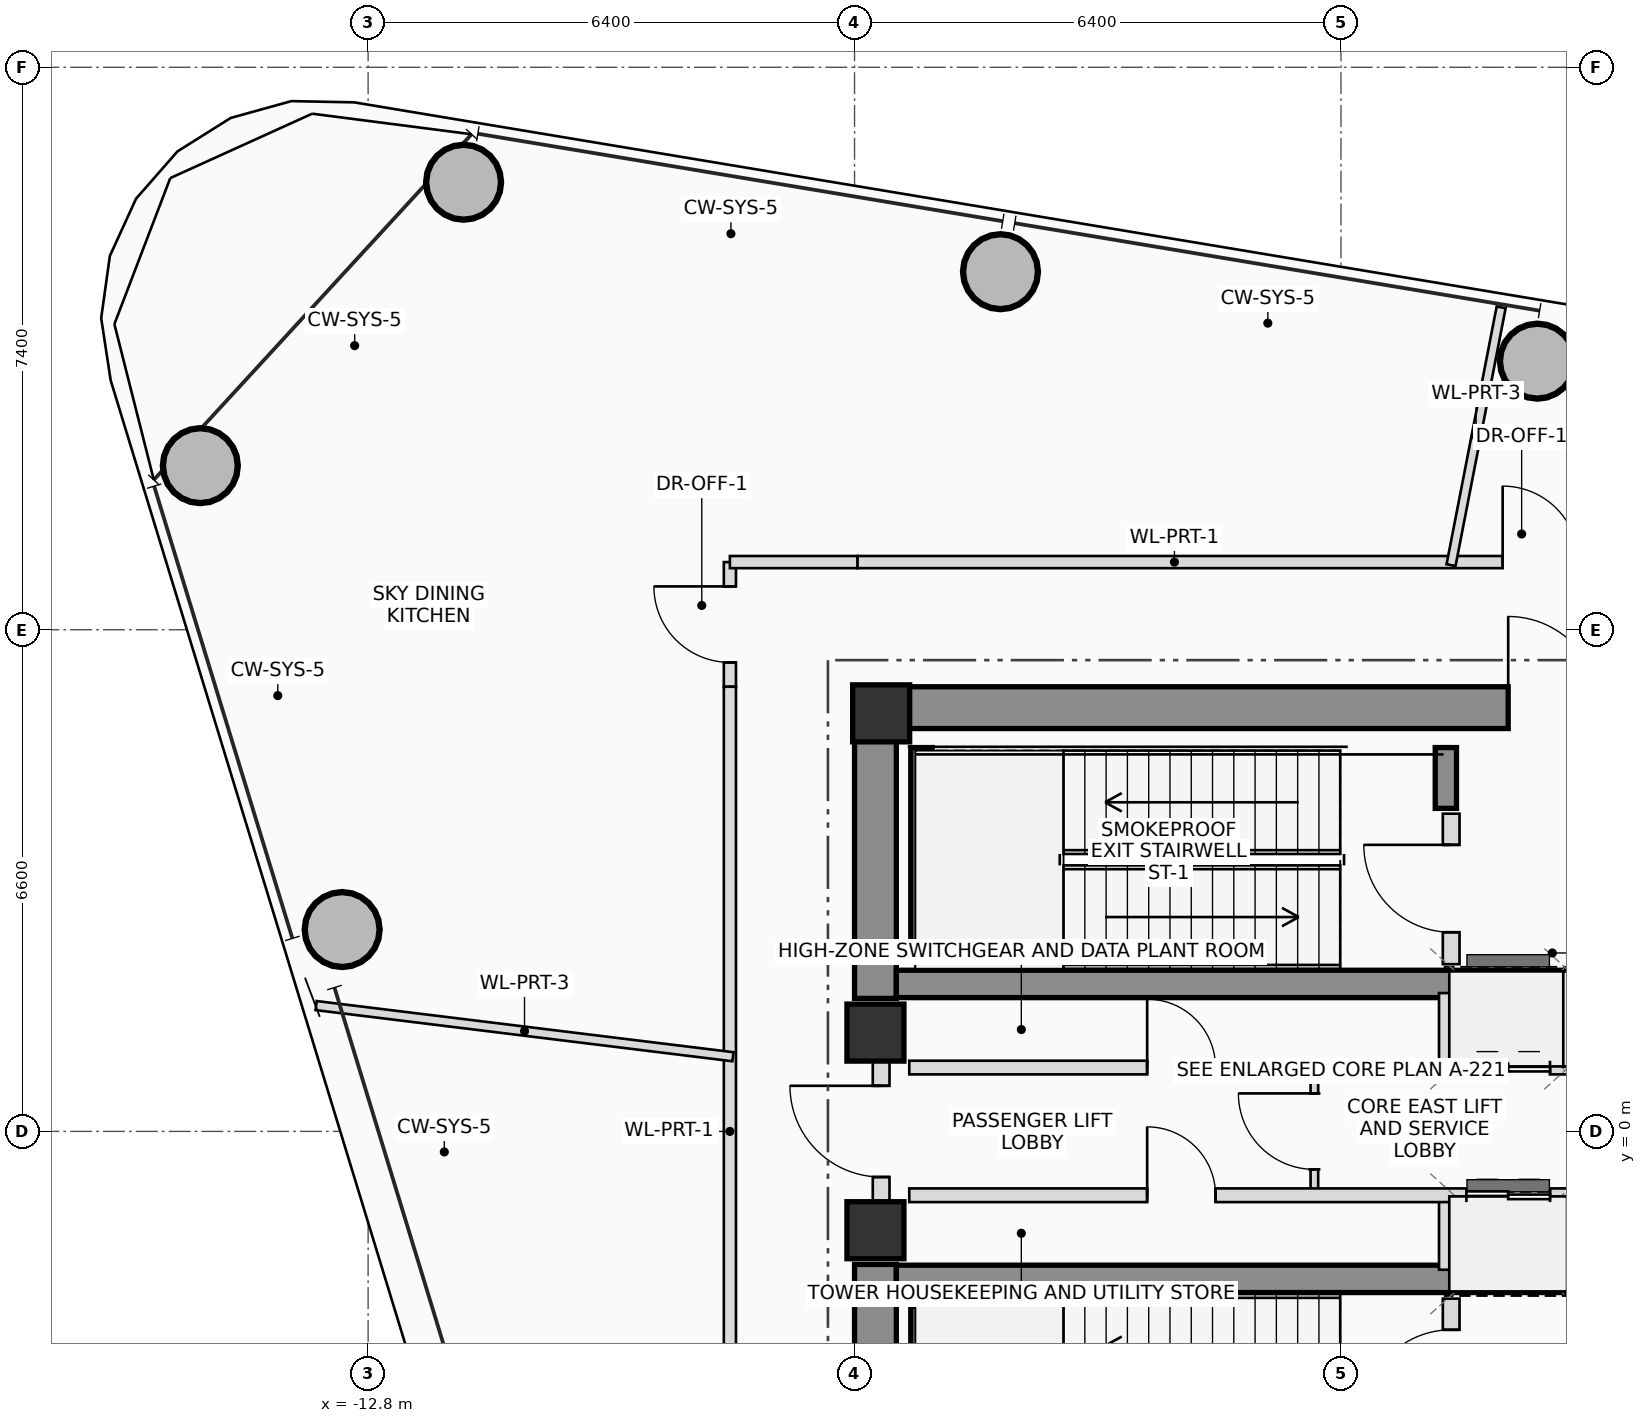
"""IFC4 building model, lengths in metres.
Left out: names, types, materials, properties, quantities, classifications, styles, units other than length and angle.
Written with IfcOpenShell. Run it as: python <this file> out.ifc"""

import sys

from ifc_helpers import new_model, si_unit, direction, frame, frame_2d, origin, origin_2d, place, context, subcontext, project, spatial, rectangle, hollow_circle, extrude, source, transform, mapped, element, fill, save


model = new_model("IFC4")
c1 = context("Model", 3, precision=1e-05, world=origin(), true_north=direction((0.0, 1.0)))
c2 = subcontext(c1, "Body", "Model", "MODEL_VIEW")
j1 = project(units=[si_unit("LENGTHUNIT", "METRE"), si_unit("PLANEANGLEUNIT", "RADIAN")], contexts=[c1])
p1 = place(None, origin())
s1 = spatial("IfcSite", under=j1, at=p1, CompositionType="ELEMENT")
p2 = place(p1, origin())
s2 = spatial("IfcBuilding", under=s1, at=p2, CompositionType="ELEMENT")
p3 = place(p2, frame((0.0, 0.0, 224.15)))
s3 = spatial("IfcBuildingStorey", under=s2, at=p3, CompositionType="ELEMENT", Elevation=224.15)
m1 = source(origin(), c2, "Body", "SweptSolid", [
    extrude(rectangle(XDim=0.75, YDim=0.75, at=origin_2d()), origin(), (0.0, 0.0, 1.0), 4.5),
])
p4 = place(p3, frame((-6.05, 5.5, 0.0), z_axis=(0.0, 0.0, 1.0), x_axis=(1.0, 0.0, 0.0)))
e1 = element("IfcColumn", 1, at=p4, inside=s3, PredefinedType="COLUMN", context=c2, shape_type="MappedRepresentation", body=[
    mapped(m1, transform((0.0, 0.0, 0.0), scale=1.0)),
])
p5 = place(p3, frame((-6.4, 5.575, 0.0), z_axis=(0.0, 0.0, 1.0), x_axis=(1.0, 0.0, 0.0)))
e2 = element("IfcWall", 2, at=p5, inside=s3, PredefinedType="SHEAR", context=c2, shape_type="SweptSolid", body=[
    extrude(rectangle(XDim=12.8, YDim=0.55, at=frame_2d((6.4, 0.0))), origin(), (0.0, 0.0, 1.0), 4.5),
])
p6 = place(p5, frame((8.6, 0.0, 0.0)))
e3 = element("IfcOpeningElement", 3, at=p6, cuts=e2, PredefinedType="OPENING", context=c2, shape_type="SweptSolid", body=[
    extrude(rectangle(XDim=1.2, YDim=2.2, at=frame_2d((0.6, 1.1))), frame((0.0, 0.285, 0.0), z_axis=(0.0, -1.0, 0.0), x_axis=(1.0, 0.0, 0.0)), (0.0, 0.0, 1.0), 0.57),
])
for number, where, z_axis, x_axis in (
    (4, (-6.125, -5.3, 0.0), (0.0, 0.0, 1.0), (0.0, 1.0, 0.0)),
    (5, (-6.125, 1.75, 0.0), (0.0, 0.0, 1.0), (0.0, 1.0, 0.0)),
):
    element("IfcWall", number, at=place(p3, frame(where, z_axis=z_axis, x_axis=x_axis)), inside=s3, PredefinedType="SHEAR", context=c2, shape_type="SweptSolid", body=[
        extrude(rectangle(XDim=3.55, YDim=0.55, at=frame_2d((1.775, 0.0))), origin(), (0.0, 0.0, 1.0), 4.5),
    ])
for number, where, z_axis, x_axis in (
    (6, (-5.85, 1.94, 0.0), (0.0, 0.0, 1.0), (1.0, 0.0, 0.0)),
    (7, (-5.85, -1.94, 0.0), (0.0, 0.0, 1.0), (1.0, 0.0, 0.0)),
):
    element("IfcWall", number, at=place(p3, frame(where, z_axis=z_axis, x_axis=x_axis)), inside=s3, PredefinedType="SHEAR", context=c2, shape_type="SweptSolid", body=[
        extrude(rectangle(XDim=11.7, YDim=0.36, at=frame_2d((5.85, 0.0))), origin(), (0.0, 0.0, 1.0), 4.5),
    ])
p7 = place(p3, frame((-5.52, 2.3, 0.0), z_axis=(0.0, 0.0, 1.0), x_axis=(0.0, 1.0, 0.0)))
e8 = element("IfcWall", 8, at=p7, inside=s3, PredefinedType="SHEAR", context=c2, shape_type="SweptSolid", body=[
    extrude(rectangle(XDim=2.75, YDim=0.28, at=frame_2d((1.375, 0.0))), origin(), (0.0, 0.0, 1.0), 4.5),
])
p8 = place(p3, frame((1.38, 4.25, 0.0), z_axis=(0.0, 0.0, 1.0), x_axis=(0.0, 1.0, 0.0)))
e9 = element("IfcWall", 9, at=p8, inside=s3, PredefinedType="SHEAR", context=c2, shape_type="SweptSolid", body=[
    extrude(rectangle(XDim=0.8, YDim=0.28, at=frame_2d((0.4, 0.0))), origin(), (0.0, 0.0, 1.0), 4.5),
])
p9 = place(p3, frame((-5.52, -5.05, 0.0), z_axis=(0.0, 0.0, 1.0), x_axis=(0.0, 1.0, 0.0)))
e10 = element("IfcWall", 10, at=p9, inside=s3, PredefinedType="SHEAR", context=c2, shape_type="SweptSolid", body=[
    extrude(rectangle(XDim=2.75, YDim=0.28, at=frame_2d((1.375, 0.0))), origin(), (0.0, 0.0, 1.0), 4.5),
])
for number, where, z_axis, x_axis in (
    (11, (-6.125, -1.3, 0.0), (0.0, 0.0, 1.0), (1.0, 0.0, 0.0)),
    (12, (-6.125, 1.3, 0.0), (0.0, 0.0, 1.0), (1.0, 0.0, 0.0)),
):
    element("IfcColumn", number, at=place(p3, frame(where, z_axis=z_axis, x_axis=x_axis)), inside=s3, PredefinedType="COLUMN", context=c2, shape_type="MappedRepresentation", body=[
        mapped(m1, transform((0.0, 0.0, 0.0), scale=1.0)),
    ])
m2 = source(origin(), c2, "Body", "SweptSolid", [
    extrude(hollow_circle(Radius=0.5, WallThickness=0.04, at=origin_2d()), origin(), (0.0, 0.0, 1.0), 4.5),
])
for number, where, z_axis, x_axis in (
    (13, (2.584, 10.134, 0.0), (0.0, 0.0, 1.0), (1.0, 0.0, 0.0)),
    (14, (-4.48, 11.311, 0.0), (0.0, 0.0, 1.0), (1.0, 0.0, 0.0)),
    (15, (-11.544, 12.488, 0.0), (0.0, 0.0, 1.0), (1.0, 0.0, 0.0)),
    (16, (-15.008, 8.759, 0.0), (0.0, 0.0, 1.0), (1.0, 0.0, 0.0)),
    (17, (-13.142, 2.656, 0.0), (0.0, 0.0, 1.0), (1.0, 0.0, 0.0)),
):
    element("IfcColumn", number, at=place(p3, frame(where, z_axis=z_axis, x_axis=x_axis)), inside=s3, PredefinedType="COLUMN", context=c2, shape_type="MappedRepresentation", body=[
        mapped(m2, transform((0.0, 0.0, 0.0), scale=1.0)),
    ])
p10 = place(p3, frame((-6.05, -0.95, 0.0), z_axis=(0.0, 0.0, 1.0), x_axis=(0.0, 1.0, 0.0)))
e18 = element("IfcWall", 18, at=p10, inside=s3, PredefinedType="PLUMBINGWALL", context=c2, shape_type="SweptSolid", body=[
    extrude(rectangle(XDim=1.9, YDim=0.22, at=frame_2d((0.95, 0.0))), origin(), (0.0, 0.0, 1.0), 3.28),
])
p11 = place(p10, frame((0.35, 0.0, 0.0)))
e19 = element("IfcOpeningElement", 19, at=p11, cuts=e18, PredefinedType="OPENING", context=c2, shape_type="SweptSolid", body=[
    extrude(rectangle(XDim=1.2, YDim=2.2, at=frame_2d((0.6, 1.1))), frame((0.0, 0.12, 0.0), z_axis=(0.0, -1.0, 0.0), x_axis=(1.0, 0.0, 0.0)), (0.0, 0.0, 1.0), 0.24),
])
p12 = place(p3, frame((1.45, 2.2, 0.0), z_axis=(0.0, 0.0, 1.0), x_axis=(0.0, 1.0, 0.0)))
e20 = element("IfcWall", 20, at=p12, inside=s3, PredefinedType="PLUMBINGWALL", context=c2, shape_type="SweptSolid", body=[
    extrude(rectangle(XDim=1.98, YDim=0.22, at=frame_2d((0.99, 0.0))), origin(), (0.0, 0.0, 1.0), 4.3),
])
p13 = place(p12, frame((0.42, 0.0, 0.0)))
e21 = element("IfcOpeningElement", 21, at=p13, cuts=e20, PredefinedType="OPENING", context=c2, shape_type="SweptSolid", body=[
    extrude(rectangle(XDim=1.15, YDim=2.15, at=frame_2d((0.575, 1.075))), frame((0.0, 0.12, 0.0), z_axis=(0.0, -1.0, 0.0), x_axis=(1.0, 0.0, 0.0)), (0.0, 0.0, 1.0), 0.24),
])
p14 = place(p3, frame((1.45, -4.18, 0.0), z_axis=(0.0, 0.0, 1.0), x_axis=(0.0, 1.0, 0.0)))
e22 = element("IfcWall", 22, at=p14, inside=s3, PredefinedType="PLUMBINGWALL", context=c2, shape_type="SweptSolid", body=[
    extrude(rectangle(XDim=1.98, YDim=0.22, at=frame_2d((0.99, 0.0))), origin(), (0.0, 0.0, 1.0), 4.3),
])
p15 = place(p14, frame((0.42, 0.0, 0.0)))
e23 = element("IfcOpeningElement", 23, at=p15, cuts=e22, PredefinedType="OPENING", context=c2, shape_type="SweptSolid", body=[
    extrude(rectangle(XDim=1.15, YDim=2.15, at=frame_2d((0.575, 1.075))), frame((0.0, 0.12, 0.0), z_axis=(0.0, -1.0, 0.0), x_axis=(1.0, 0.0, 0.0)), (0.0, 0.0, 1.0), 0.24),
])
p16 = place(p3, frame((-0.35, -0.84, 0.0), z_axis=(0.0, 0.0, 1.0), x_axis=(0.0, 1.0, 0.0)))
e24 = element("IfcWall", 24, at=p16, inside=s3, PredefinedType="PARTITIONING", context=c2, shape_type="SweptSolid", body=[
    extrude(rectangle(XDim=1.68, YDim=0.1, at=frame_2d((0.84, 0.0))), origin(), (0.0, 0.0, 1.0), 4.3),
])
p17 = place(p16, frame((0.34, 0.0, 0.0)))
e25 = element("IfcOpeningElement", 25, at=p17, cuts=e24, PredefinedType="OPENING", context=c2, shape_type="SweptSolid", body=[
    extrude(rectangle(XDim=1.0, YDim=2.25, at=frame_2d((0.5, 1.125))), frame((0.0, 0.06, 0.0), z_axis=(0.0, -1.0, 0.0), x_axis=(1.0, 0.0, 0.0)), (0.0, 0.0, 1.0), 0.12),
])
for number, where, z_axis, x_axis in (
    (26, (1.38, 0.84, 0.0), (0.0, 0.0, 1.0), (0.0, 1.0, 0.0)),
    (27, (1.38, -1.82, 0.0), (0.0, 0.0, 1.0), (0.0, 1.0, 0.0)),
    (28, (3.02, 0.84, 0.0), (0.0, 0.0, 1.0), (0.0, 1.0, 0.0)),
    (29, (3.02, -1.82, 0.0), (0.0, 0.0, 1.0), (0.0, 1.0, 0.0)),
):
    element("IfcWall", number, at=place(p3, frame(where, z_axis=z_axis, x_axis=x_axis)), inside=s3, PredefinedType="PLUMBINGWALL", context=c2, shape_type="SweptSolid", body=[
        extrude(rectangle(XDim=0.98, YDim=0.18, at=frame_2d((0.49, 0.0))), origin(), (0.0, 0.0, 1.0), 4.3),
    ])
p18 = place(p3, frame((-5.68, 0.84, 0.0), z_axis=(0.0, 0.0, 1.0), x_axis=(1.0, 0.0, 0.0)))
e30 = element("IfcWall", 30, at=p18, inside=s3, PredefinedType="PLUMBINGWALL", context=c2, shape_type="SweptSolid", body=[
    extrude(rectangle(XDim=11.33, YDim=0.18, at=frame_2d((5.665, 0.0))), origin(), (0.0, 0.0, 1.0), 4.3),
])
p19 = place(p18, frame((3.13, 0.0, 0.0)))
e31 = element("IfcOpeningElement", 31, at=p19, cuts=e30, PredefinedType="OPENING", context=c2, shape_type="SweptSolid", body=[
    extrude(rectangle(XDim=0.9, YDim=2.05, at=frame_2d((0.45, 1.025))), frame((0.0, 0.1, 0.0), z_axis=(0.0, -1.0, 0.0), x_axis=(1.0, 0.0, 0.0)), (0.0, 0.0, 1.0), 0.2),
])
p20 = place(p18, frame((7.33, 0.0, 0.0)))
e32 = element("IfcOpeningElement", 32, at=p20, cuts=e30, PredefinedType="OPENING", context=c2, shape_type="SweptSolid", body=[
    extrude(rectangle(XDim=1.1, YDim=2.2, at=frame_2d((0.55, 1.1))), frame((0.0, 0.1, 0.0), z_axis=(0.0, -1.0, 0.0), x_axis=(1.0, 0.0, 0.0)), (0.0, 0.0, 1.0), 0.2),
])
p21 = place(p18, frame((8.83, 0.0, 0.0)))
e33 = element("IfcOpeningElement", 33, at=p21, cuts=e30, PredefinedType="OPENING", context=c2, shape_type="SweptSolid", body=[
    extrude(rectangle(XDim=1.1, YDim=2.2, at=frame_2d((0.55, 1.1))), frame((0.0, 0.1, 0.0), z_axis=(0.0, -1.0, 0.0), x_axis=(1.0, 0.0, 0.0)), (0.0, 0.0, 1.0), 0.2),
])
p22 = place(p18, frame((10.25, 0.0, 0.0)))
e34 = element("IfcOpeningElement", 34, at=p22, cuts=e30, PredefinedType="OPENING", context=c2, shape_type="SweptSolid", body=[
    extrude(rectangle(XDim=0.9, YDim=2.05, at=frame_2d((0.45, 1.025))), frame((0.0, 0.1, 0.0), z_axis=(0.0, -1.0, 0.0), x_axis=(1.0, 0.0, 0.0)), (0.0, 0.0, 1.0), 0.2),
])
p23 = place(p3, frame((-5.68, -0.84, 0.0), z_axis=(0.0, 0.0, 1.0), x_axis=(1.0, 0.0, 0.0)))
e35 = element("IfcWall", 35, at=p23, inside=s3, PredefinedType="PLUMBINGWALL", context=c2, shape_type="SweptSolid", body=[
    extrude(rectangle(XDim=11.33, YDim=0.18, at=frame_2d((5.665, 0.0))), origin(), (0.0, 0.0, 1.0), 4.3),
])
p24 = place(p23, frame((3.13, 0.0, 0.0)))
e36 = element("IfcOpeningElement", 36, at=p24, cuts=e35, PredefinedType="OPENING", context=c2, shape_type="SweptSolid", body=[
    extrude(rectangle(XDim=0.9, YDim=2.05, at=frame_2d((0.45, 1.025))), frame((0.0, 0.1, 0.0), z_axis=(0.0, -1.0, 0.0), x_axis=(1.0, 0.0, 0.0)), (0.0, 0.0, 1.0), 0.2),
])
p25 = place(p23, frame((7.33, 0.0, 0.0)))
e37 = element("IfcOpeningElement", 37, at=p25, cuts=e35, PredefinedType="OPENING", context=c2, shape_type="SweptSolid", body=[
    extrude(rectangle(XDim=1.1, YDim=2.2, at=frame_2d((0.55, 1.1))), frame((0.0, 0.1, 0.0), z_axis=(0.0, -1.0, 0.0), x_axis=(1.0, 0.0, 0.0)), (0.0, 0.0, 1.0), 0.2),
])
p26 = place(p23, frame((9.58, 0.0, 0.0)))
e38 = element("IfcOpeningElement", 38, at=p26, cuts=e35, PredefinedType="OPENING", context=c2, shape_type="SweptSolid", body=[
    extrude(rectangle(XDim=0.9, YDim=2.05, at=frame_2d((0.45, 1.025))), frame((0.0, 0.1, 0.0), z_axis=(0.0, -1.0, 0.0), x_axis=(1.0, 0.0, 0.0)), (0.0, 0.0, 1.0), 0.2),
])
p27 = place(p3, frame((-8.04, 5.85, 0.0), z_axis=(0.0, 0.0, 1.0), x_axis=(0.0, 1.0, 0.0)))
e39 = element("IfcWall", 39, at=p27, inside=s3, PredefinedType="PARTITIONING", context=c2, shape_type="SweptSolid", body=[
    extrude(rectangle(XDim=1.64, YDim=0.16, at=frame_2d((0.82, 0.0))), origin(), (0.0, 0.0, 1.0), 3.705),
])
p28 = place(p27, frame((0.32, 0.0, 0.0)))
e40 = element("IfcOpeningElement", 40, at=p28, cuts=e39, PredefinedType="OPENING", context=c2, shape_type="SweptSolid", body=[
    extrude(rectangle(XDim=1.0, YDim=2.25, at=frame_2d((0.5, 1.125))), frame((0.0, 0.09, 0.0), z_axis=(0.0, -1.0, 0.0), x_axis=(1.0, 0.0, 0.0)), (0.0, 0.0, 1.0), 0.18),
])
p29 = place(p3, frame((-8.04, 7.49, 0.0), z_axis=(0.0, 0.0, 1.0), x_axis=(1.0, 0.0, 0.0)))
e41 = element("IfcWall", 41, at=p29, inside=s3, PredefinedType="PARTITIONING", context=c2, shape_type="SweptSolid", body=[
    extrude(rectangle(XDim=1.68, YDim=0.16, at=frame_2d((0.84, 0.0))), origin(), (0.0, 0.0, 1.0), 3.705),
])
p30 = place(p3, frame((-6.36, 7.49, 0.0), z_axis=(0.0, 0.0, 1.0), x_axis=(1.0, 0.0, 0.0)))
e42 = element("IfcWall", 42, at=p30, inside=s3, PredefinedType="PARTITIONING", context=c2, shape_type="SweptSolid", body=[
    extrude(rectangle(XDim=9.81, YDim=0.16, at=frame_2d((4.905, 0.0))), origin(), (0.0, 0.0, 1.0), 3.705),
])
p31 = place(p30, frame((8.487, 0.0, 0.0)))
e43 = element("IfcOpeningElement", 43, at=p31, cuts=e42, PredefinedType="OPENING", context=c2, shape_type="SweptSolid", body=[
    extrude(rectangle(XDim=1.0, YDim=2.25, at=frame_2d((0.5, 1.125))), frame((0.0, 0.09, 0.0), z_axis=(0.0, -1.0, 0.0), x_axis=(1.0, 0.0, 0.0)), (0.0, 0.0, 1.0), 0.18),
])
p32 = place(p3, frame((-8.04, -5.85, 0.0), z_axis=(0.0, 0.0, 1.0), x_axis=(0.0, 1.0, 0.0)))
e44 = element("IfcWall", 44, at=p32, inside=s3, PredefinedType="PARTITIONING", context=c2, shape_type="SweptSolid", body=[
    extrude(rectangle(XDim=11.7, YDim=0.16, at=frame_2d((5.85, 0.0))), origin(), (0.0, 0.0, 1.0), 3.705),
])
p33 = place(p3, frame((1.448, 7.45, 0.0), z_axis=(0.0, 0.0, 1.0), x_axis=(0.19085452876, 0.981618331558, 0.0)))
e45 = element("IfcWall", 45, at=p33, inside=s3, PredefinedType="PARTITIONING", context=c2, shape_type="SweptSolid", body=[
    extrude(rectangle(XDim=3.455, YDim=0.12, at=frame_2d((1.728, 0.0))), origin(), (0.0, 0.0, 1.0), 3.865),
])
p34 = place(p3, frame((-8.0, 0.982, 0.0), z_axis=(0.0, 0.0, 1.0), x_axis=(-0.992546737371, 0.121864572927, 0.0)))
e46 = element("IfcWall", 46, at=p34, inside=s3, PredefinedType="PARTITIONING", context=c2, shape_type="SweptSolid", body=[
    extrude(rectangle(XDim=5.525, YDim=0.12, at=frame_2d((2.763, 0.0))), origin(), (0.0, 0.0, 1.0), 3.865),
])
p35 = place(p6, origin())
e47 = element("IfcDoor", 47, at=p35, inside=s3, OperationType="SINGLE_SWING_LEFT", PredefinedType="DOOR", context=c2, shape_type="SweptSolid", body=[
    extrude(rectangle(XDim=1.2, YDim=2.2, at=frame_2d((0.6, 1.1))), frame((0.0, 0.025, 0.0), z_axis=(0.0, -1.0, 0.0), x_axis=(1.0, 0.0, 0.0)), (0.0, 0.0, 1.0), 0.05),
])
fill(e3, e47)
p36 = place(p11, origin())
e48 = element("IfcDoor", 48, at=p36, inside=s3, OperationType="SINGLE_SWING_RIGHT", PredefinedType="DOOR", context=c2, shape_type="SweptSolid", body=[
    extrude(rectangle(XDim=1.2, YDim=2.2, at=frame_2d((0.6, 1.1))), frame((0.0, 0.025, 0.0), z_axis=(0.0, -1.0, 0.0), x_axis=(1.0, 0.0, 0.0)), (0.0, 0.0, 1.0), 0.05),
])
fill(e19, e48)
p37 = place(p13, origin())
e49 = element("IfcDoor", 49, at=p37, inside=s3, OperationType="SINGLE_SWING_RIGHT", PredefinedType="DOOR", context=c2, shape_type="SweptSolid", body=[
    extrude(rectangle(XDim=1.15, YDim=2.15, at=frame_2d((0.575, 1.075))), frame((0.0, 0.025, 0.0), z_axis=(0.0, -1.0, 0.0), x_axis=(1.0, 0.0, 0.0)), (0.0, 0.0, 1.0), 0.05),
])
fill(e21, e49)
p38 = place(p15, origin())
e50 = element("IfcDoor", 50, at=p38, inside=s3, OperationType="SINGLE_SWING_LEFT", PredefinedType="DOOR", context=c2, shape_type="SweptSolid", body=[
    extrude(rectangle(XDim=1.15, YDim=2.15, at=frame_2d((0.575, 1.075))), frame((0.0, 0.025, 0.0), z_axis=(0.0, -1.0, 0.0), x_axis=(1.0, 0.0, 0.0)), (0.0, 0.0, 1.0), 0.05),
])
fill(e23, e50)
p39 = place(p17, origin())
e51 = element("IfcDoor", 51, at=p39, inside=s3, OperationType="SINGLE_SWING_RIGHT", PredefinedType="DOOR", context=c2, shape_type="SweptSolid", body=[
    extrude(rectangle(XDim=1.0, YDim=2.25, at=frame_2d((0.5, 1.125))), frame((0.0, 0.025, 0.0), z_axis=(0.0, -1.0, 0.0), x_axis=(1.0, 0.0, 0.0)), (0.0, 0.0, 1.0), 0.05),
])
fill(e25, e51)
p40 = place(p19, origin())
e52 = element("IfcDoor", 52, at=p40, inside=s3, OperationType="SINGLE_SWING_LEFT", PredefinedType="DOOR", context=c2, shape_type="SweptSolid", body=[
    extrude(rectangle(XDim=0.9, YDim=2.05, at=frame_2d((0.45, 1.025))), frame((0.0, 0.025, 0.0), z_axis=(0.0, -1.0, 0.0), x_axis=(1.0, 0.0, 0.0)), (0.0, 0.0, 1.0), 0.05),
])
fill(e31, e52)
p41 = place(p20, origin())
e53 = element("IfcDoor", 53, at=p41, inside=s3, OperationType="DOUBLE_DOOR_SLIDING", PredefinedType="DOOR", context=c2, shape_type="SweptSolid", body=[
    extrude(rectangle(XDim=1.1, YDim=2.2, at=frame_2d((0.55, 1.1))), frame((0.0, 0.025, 0.0), z_axis=(0.0, -1.0, 0.0), x_axis=(1.0, 0.0, 0.0)), (0.0, 0.0, 1.0), 0.05),
])
fill(e32, e53)
p42 = place(p24, origin())
e54 = element("IfcDoor", 54, at=p42, inside=s3, OperationType="SINGLE_SWING_LEFT", PredefinedType="DOOR", context=c2, shape_type="SweptSolid", body=[
    extrude(rectangle(XDim=0.9, YDim=2.05, at=frame_2d((0.45, 1.025))), frame((0.0, 0.025, 0.0), z_axis=(0.0, -1.0, 0.0), x_axis=(1.0, 0.0, 0.0)), (0.0, 0.0, 1.0), 0.05),
])
fill(e36, e54)
p43 = place(p25, origin())
e55 = element("IfcDoor", 55, at=p43, inside=s3, OperationType="DOUBLE_DOOR_SLIDING", PredefinedType="DOOR", context=c2, shape_type="SweptSolid", body=[
    extrude(rectangle(XDim=1.1, YDim=2.2, at=frame_2d((0.55, 1.1))), frame((0.0, 0.025, 0.0), z_axis=(0.0, -1.0, 0.0), x_axis=(1.0, 0.0, 0.0)), (0.0, 0.0, 1.0), 0.05),
])
fill(e37, e55)
p44 = place(p28, origin())
e56 = element("IfcDoor", 56, at=p44, inside=s3, OperationType="SINGLE_SWING_RIGHT", PredefinedType="DOOR", context=c2, shape_type="SweptSolid", body=[
    extrude(rectangle(XDim=1.0, YDim=2.25, at=frame_2d((0.5, 1.125))), frame((0.0, 0.025, 0.0), z_axis=(0.0, -1.0, 0.0), x_axis=(1.0, 0.0, 0.0)), (0.0, 0.0, 1.0), 0.05),
])
fill(e40, e56)
p45 = place(p31, origin())
e57 = element("IfcDoor", 57, at=p45, inside=s3, OperationType="SINGLE_SWING_LEFT", PredefinedType="DOOR", context=c2, shape_type="SweptSolid", body=[
    extrude(rectangle(XDim=1.0, YDim=2.25, at=frame_2d((0.5, 1.125))), frame((0.0, 0.025, 0.0), z_axis=(0.0, -1.0, 0.0), x_axis=(1.0, 0.0, 0.0)), (0.0, 0.0, 1.0), 0.05),
])
fill(e43, e57)
save(model, sys.argv[1])
